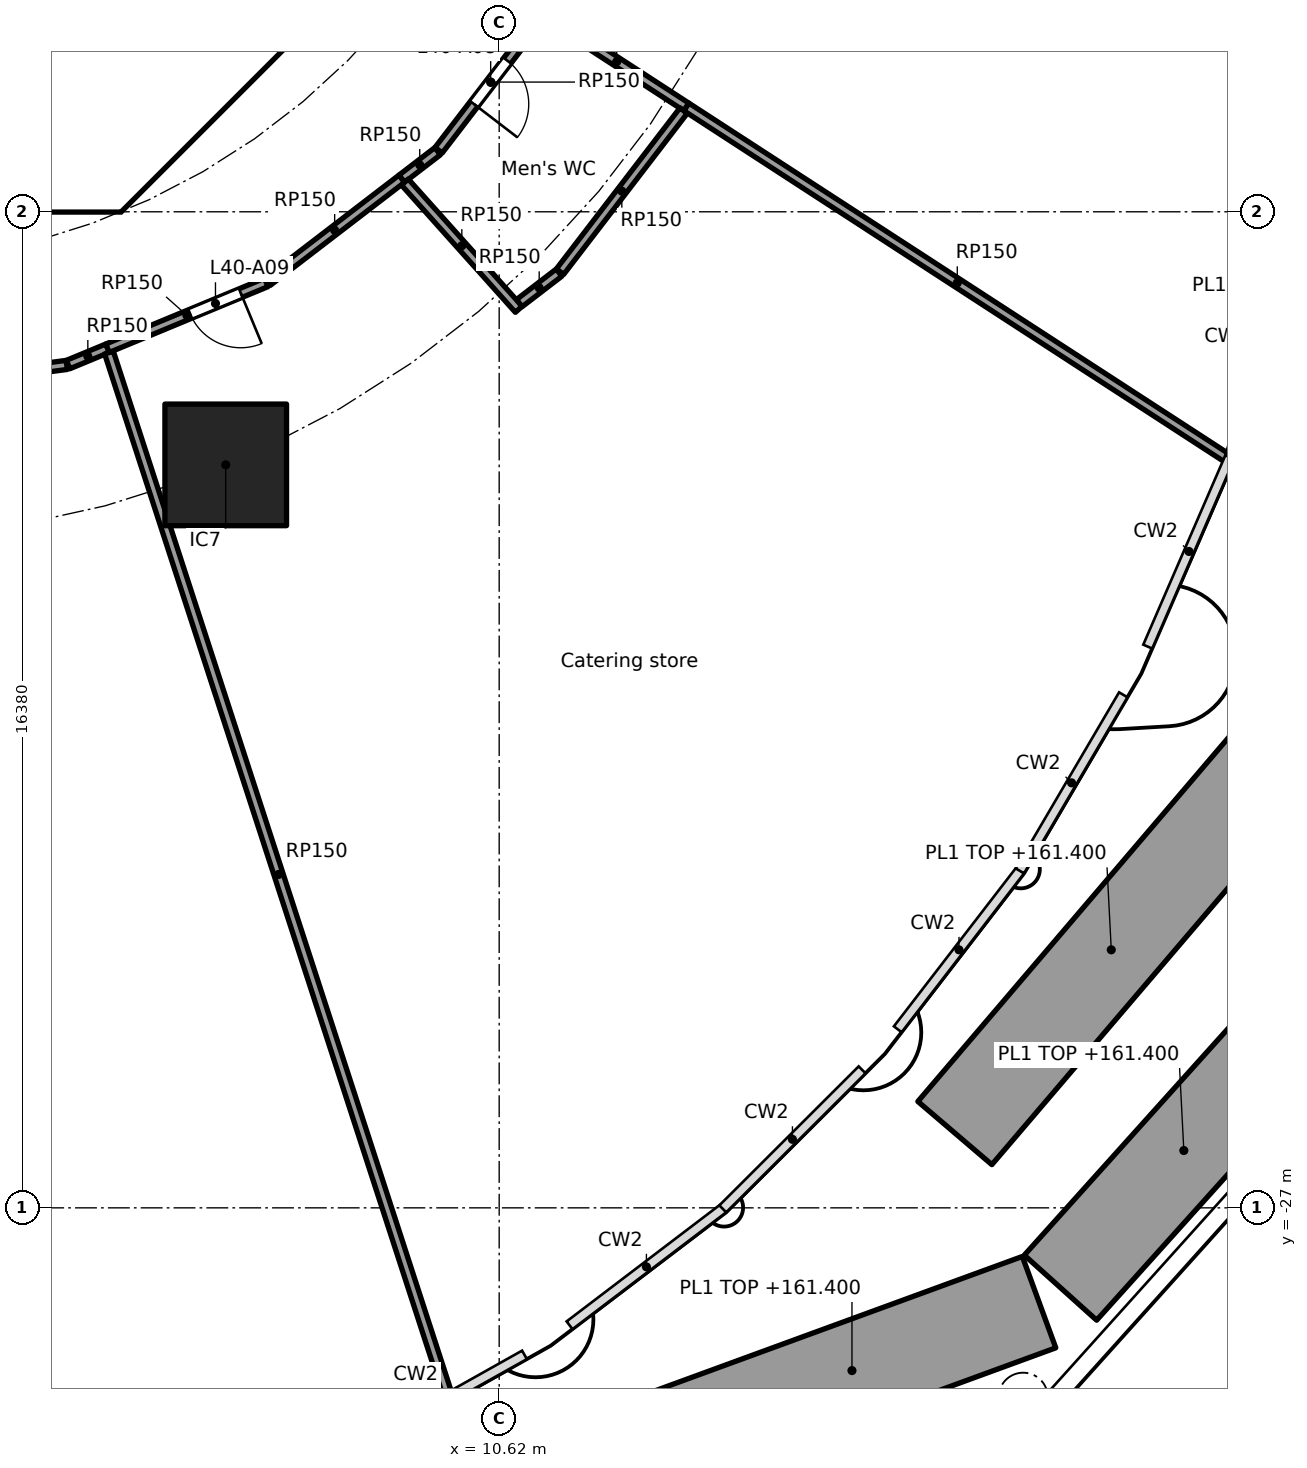
"""IFC4 building model, lengths in metres.
Left out: names, types, materials, properties, quantities, classifications, styles, units other than length and angle.
Written with IfcOpenShell. Run it as: python <this file> out.ifc"""

import sys

from ifc_helpers import new_model, si_unit, direction, frame, frame_2d, origin, origin_2d, place, context, subcontext, project, spatial, polyline, rectangle, outline, extrude, element, fill, save


model = new_model("IFC4")
c1 = context("Model", 3, precision=1e-05, world=origin(), true_north=direction((0.0, 1.0)))
c2 = subcontext(c1, "Body", "Model", "MODEL_VIEW")
j1 = project(units=[si_unit("LENGTHUNIT", "METRE"), si_unit("PLANEANGLEUNIT", "RADIAN")], contexts=[c1])
p1 = place(None, origin())
s1 = spatial("IfcSite", under=j1, at=p1, CompositionType="ELEMENT")
p2 = place(p1, origin())
s2 = spatial("IfcBuilding", under=s1, at=p2, CompositionType="ELEMENT")
p3 = place(p2, frame((0.0, 0.0, 160.3)))
s3 = spatial("IfcBuildingStorey", under=s2, at=p3, CompositionType="ELEMENT", Elevation=160.3)
p4 = place(p3, frame((6.123, -14.782, 0.0), z_axis=(0.0, 0.0, 1.0), x_axis=(1.0, 0.0, 0.0)))
e1 = element("IfcColumn", 1, at=p4, inside=s3, PredefinedType="COLUMN", context=c2, shape_type="SweptSolid", body=[
    extrude(rectangle(XDim=2.0, YDim=2.0, at=origin_2d()), origin(), (0.0, 0.0, 1.0), 5.6),
])
p5 = place(p3, frame((18.114, -25.77, 0.0), z_axis=(0.0, 0.0, 1.0), x_axis=(0.649270204453, 0.76055782266, 0.0)))
e2 = element("IfcWall", 2, at=p5, inside=s3, PredefinedType="SOLIDWALL", context=c2, shape_type="SweptSolid", body=[
    extrude(rectangle(XDim=7.924, YDim=1.6, at=frame_2d((3.962, 0.0))), origin(), (0.0, 0.0, 1.0), 1.1),
])
p6 = place(p3, frame((19.498, -28.551, 0.0), z_axis=(0.0, 0.0, 1.0), x_axis=(-0.939155395948, -0.343492565074, 0.0)))
e3 = element("IfcWall", 3, at=p6, inside=s3, PredefinedType="SOLIDWALL", context=c2, shape_type="SweptSolid", body=[
    extrude(rectangle(XDim=6.552, YDim=1.6, at=frame_2d((3.276, 0.0))), origin(), (0.0, 0.0, 1.0), 1.1),
])
p7 = place(p3, frame((23.908, -23.802, 0.0), z_axis=(0.0, 0.0, 1.0), x_axis=(-0.668693462174, -0.743538199184, 0.0)))
e4 = element("IfcWall", 4, at=p7, inside=s3, PredefinedType="SOLIDWALL", context=c2, shape_type="SweptSolid", body=[
    extrude(rectangle(XDim=6.067, YDim=1.6, at=frame_2d((3.034, 0.0))), origin(), (0.0, 0.0, 1.0), 1.1),
])
p8 = place(p3, frame((4.613, -9.988, 0.0), z_axis=(0.0, 0.0, 1.0), x_axis=(0.707106781187, 0.707106781187, 0.0)))
e5 = element("IfcWall", 5, at=p8, inside=s3, PredefinedType="SHEAR", context=c2, shape_type="SweptSolid", body=[
    extrude(rectangle(XDim=7.602, YDim=0.6, at=frame_2d((3.801, 0.0))), origin(), (0.0, 0.0, 1.0), 5.34),
])
p9 = place(p8, frame((3.201, 0.0, 0.0)))
e6 = element("IfcOpeningElement", 6, at=p9, cuts=e5, PredefinedType="OPENING", context=c2, shape_type="SweptSolid", body=[
    extrude(rectangle(XDim=1.2, YDim=2.1, at=frame_2d((0.6, 1.05))), frame((0.0, 0.31, 0.0), z_axis=(0.0, -1.0, 0.0), x_axis=(1.0, 0.0, 0.0)), (0.0, 0.0, 1.0), 0.62),
])
p10 = place(p3, frame((4.0, -10.025, 0.0), z_axis=(0.0, 0.0, 1.0), x_axis=(0.0, 1.0, 0.0)))
e7 = element("IfcWall", 7, at=p10, inside=s3, PredefinedType="SOLIDWALL", context=c2, shape_type="SweptSolid", body=[
    extrude(rectangle(XDim=3.0, YDim=0.2, at=frame_2d((1.5, 0.0))), origin(), (0.0, 0.0, 1.0), 5.34),
])
p11 = place(p10, frame((0.975, 0.0, 0.0)))
e8 = element("IfcOpeningElement", 8, at=p11, cuts=e7, PredefinedType="OPENING", context=c2, shape_type="SweptSolid", body=[
    extrude(rectangle(XDim=1.1, YDim=2.1, at=frame_2d((0.55, 1.05))), frame((0.0, 0.11, 0.0), z_axis=(0.0, -1.0, 0.0), x_axis=(1.0, 0.0, 0.0)), (0.0, 0.0, 1.0), 0.22),
])
p12 = place(p3, origin())
e9 = element("IfcWall", 9, at=p12, inside=s3, PredefinedType="SHEAR", context=c2, shape_type="SweptSolid", body=[
    extrude(outline(polyline([(-4.152, -10.025), (4.152, -10.025), (4.401, -9.776), (4.825, -10.2), (4.401, -10.625), (-4.401, -10.625), (-4.825, -10.2), (-4.401, -9.776), (-4.152, -10.025)])), origin(), (0.0, 0.0, 1.0), 5.34),
])
p13 = place(p3, frame((3.508, -13.138, 0.0), z_axis=(0.0, 0.0, 1.0), x_axis=(-0.991448403586, -0.130499283623, 0.0)))
e10 = element("IfcWall", 10, at=p13, inside=s3, PredefinedType="PARTITIONING", context=c2, shape_type="SweptSolid", body=[
    extrude(rectangle(XDim=3.527, YDim=0.15, at=frame_2d((1.763, 0.0))), origin(), (0.0, 0.0, 1.0), 5.34),
])
p14 = place(p13, frame((1.313, 0.0, 0.0)))
e11 = element("IfcOpeningElement", 11, at=p14, cuts=e10, PredefinedType="OPENING", context=c2, shape_type="SweptSolid", body=[
    extrude(rectangle(XDim=0.9, YDim=2.1, at=frame_2d((0.45, 1.05))), frame((0.0, 0.085, 0.0), z_axis=(0.0, -1.0, 0.0), x_axis=(1.0, 0.0, 0.0)), (0.0, 0.0, 1.0), 0.17),
])
p15 = place(p3, frame((4.18, -12.863, 0.0), z_axis=(0.0, 0.0, 1.0), x_axis=(-0.923877031545, -0.382689470177, 0.0)))
e12 = element("IfcWall", 12, at=p15, inside=s3, PredefinedType="PARTITIONING", context=c2, shape_type="SweptSolid", body=[
    extrude(rectangle(XDim=0.702, YDim=0.15, at=frame_2d((0.351, 0.0))), origin(), (0.0, 0.0, 1.0), 5.34),
])
p16 = place(p3, frame((4.203, -12.935, 0.0), z_axis=(0.0, 0.0, 1.0), x_axis=(0.309019390558, -0.951055737725, 0.0)))
e13 = element("IfcWall", 13, at=p16, inside=s3, PredefinedType="PARTITIONING", context=c2, shape_type="SweptSolid", body=[
    extrude(rectangle(XDim=18.048, YDim=0.15, at=frame_2d((9.024, 0.0))), origin(), (0.0, 0.0, 1.0), 5.34),
])
p17 = place(p3, frame((6.789, -11.782, 0.0), z_axis=(0.0, 0.0, 1.0), x_axis=(-0.923883033442, -0.382674980262, 0.0)))
e14 = element("IfcWall", 14, at=p17, inside=s3, PredefinedType="PARTITIONING", context=c2, shape_type="SweptSolid", body=[
    extrude(rectangle(XDim=2.824, YDim=0.15, at=frame_2d((1.412, 0.0))), origin(), (0.0, 0.0, 1.0), 5.34),
])
p18 = place(p17, frame((0.454, 0.0, 0.0)))
e15 = element("IfcOpeningElement", 15, at=p18, cuts=e14, PredefinedType="OPENING", context=c2, shape_type="SweptSolid", body=[
    extrude(rectangle(XDim=0.9, YDim=2.1, at=frame_2d((0.45, 1.05))), frame((0.0, 0.085, 0.0), z_axis=(0.0, -1.0, 0.0), x_axis=(1.0, 0.0, 0.0)), (0.0, 0.0, 1.0), 0.17),
])
p19 = place(p3, frame((9.019, -10.075, 0.0), z_axis=(0.0, 0.0, 1.0), x_axis=(-0.793356581691, -0.608757204711, 0.0)))
e16 = element("IfcWall", 16, at=p19, inside=s3, PredefinedType="PARTITIONING", context=c2, shape_type="SweptSolid", body=[
    extrude(rectangle(XDim=2.785, YDim=0.15, at=frame_2d((1.393, 0.0))), origin(), (0.0, 0.0, 1.0), 5.34),
])
p20 = place(p3, frame((9.607, -9.624, 0.0), z_axis=(0.0, 0.0, 1.0), x_axis=(-0.793431391307, -0.608659697441, 0.0)))
e17 = element("IfcWall", 17, at=p20, inside=s3, PredefinedType="PARTITIONING", context=c2, shape_type="SweptSolid", body=[
    extrude(rectangle(XDim=0.741, YDim=0.15, at=frame_2d((0.371, 0.0))), origin(), (0.0, 0.0, 1.0), 5.34),
])
p21 = place(p3, frame((10.942, -12.224, 0.0), z_axis=(0.0, 0.0, 1.0), x_axis=(-0.666993055926, 0.745063932389, 0.0)))
e18 = element("IfcWall", 18, at=p21, inside=s3, PredefinedType="PARTITIONING", context=c2, shape_type="SweptSolid", body=[
    extrude(rectangle(XDim=2.808, YDim=0.15, at=frame_2d((1.404, 0.0))), origin(), (0.0, 0.0, 1.0), 5.34),
])
p22 = place(p3, frame((11.343, -7.366, 0.0), z_axis=(0.0, 0.0, 1.0), x_axis=(-0.608732750311, -0.793375345407, 0.0)))
e19 = element("IfcWall", 19, at=p22, inside=s3, PredefinedType="PARTITIONING", context=c2, shape_type="SweptSolid", body=[
    extrude(rectangle(XDim=2.824, YDim=0.15, at=frame_2d((1.412, 0.0))), origin(), (0.0, 0.0, 1.0), 5.34),
])
p23 = place(p22, frame((0.968, 0.0, 0.0)))
e20 = element("IfcOpeningElement", 20, at=p23, cuts=e19, PredefinedType="OPENING", context=c2, shape_type="SweptSolid", body=[
    extrude(rectangle(XDim=0.9, YDim=2.1, at=frame_2d((0.45, 1.05))), frame((0.0, 0.085, 0.0), z_axis=(0.0, -1.0, 0.0), x_axis=(1.0, 0.0, 0.0)), (0.0, 0.0, 1.0), 0.17),
])
p24 = place(p3, frame((11.406, -7.407, 0.0), z_axis=(0.0, 0.0, 1.0), x_axis=(0.838682314257, -0.544620946855, 0.0)))
e21 = element("IfcWall", 21, at=p24, inside=s3, PredefinedType="PARTITIONING", context=c2, shape_type="SweptSolid", body=[
    extrude(rectangle(XDim=2.733, YDim=0.15, at=frame_2d((1.367, 0.0))), origin(), (0.0, 0.0, 1.0), 5.34),
])
p25 = place(p3, frame((11.604, -11.621, 0.0), z_axis=(0.0, 0.0, 1.0), x_axis=(-0.793219322038, -0.608936045201, 0.0)))
e22 = element("IfcWall", 22, at=p25, inside=s3, PredefinedType="PARTITIONING", context=c2, shape_type="SweptSolid", body=[
    extrude(rectangle(XDim=0.823, YDim=0.15, at=frame_2d((0.411, 0.0))), origin(), (0.0, 0.0, 1.0), 5.34),
])
p26 = place(p3, frame((13.653, -8.956, 0.0), z_axis=(0.0, 0.0, 1.0), x_axis=(-0.608763124529, -0.79335203927, 0.0)))
e23 = element("IfcWall", 23, at=p26, inside=s3, PredefinedType="PARTITIONING", context=c2, shape_type="SweptSolid", body=[
    extrude(rectangle(XDim=3.338, YDim=0.15, at=frame_2d((1.669, 0.0))), origin(), (0.0, 0.0, 1.0), 5.34),
])
p27 = place(p3, frame((13.699, -8.896, 0.0), z_axis=(0.0, 0.0, 1.0), x_axis=(0.838668797017, -0.544641761996, 0.0)))
e24 = element("IfcWall", 24, at=p27, inside=s3, PredefinedType="PARTITIONING", context=c2, shape_type="SweptSolid", body=[
    extrude(rectangle(XDim=10.623, YDim=0.15, at=frame_2d((5.312, 0.0))), origin(), (0.0, 0.0, 1.0), 5.34),
])
p28 = place(p11, origin())
e25 = element("IfcDoor", 25, at=p28, inside=s3, OperationType="SINGLE_SWING_LEFT", PredefinedType="DOOR", context=c2, shape_type="SweptSolid", body=[
    extrude(rectangle(XDim=1.1, YDim=2.1, at=frame_2d((0.55, 1.05))), frame((0.0, 0.025, 0.0), z_axis=(0.0, -1.0, 0.0), x_axis=(1.0, 0.0, 0.0)), (0.0, 0.0, 1.0), 0.05),
])
fill(e8, e25)
p29 = place(p23, origin())
e26 = element("IfcDoor", 26, at=p29, inside=s3, OperationType="SINGLE_SWING_RIGHT", PredefinedType="DOOR", context=c2, shape_type="SweptSolid", body=[
    extrude(rectangle(XDim=0.9, YDim=2.1, at=frame_2d((0.45, 1.05))), frame((0.0, 0.025, 0.0), z_axis=(0.0, -1.0, 0.0), x_axis=(1.0, 0.0, 0.0)), (0.0, 0.0, 1.0), 0.05),
])
fill(e20, e26)
p30 = place(p18, origin())
e27 = element("IfcDoor", 27, at=p30, inside=s3, OperationType="SINGLE_SWING_LEFT", PredefinedType="DOOR", context=c2, shape_type="SweptSolid", body=[
    extrude(rectangle(XDim=0.9, YDim=2.1, at=frame_2d((0.45, 1.05))), frame((0.0, 0.025, 0.0), z_axis=(0.0, -1.0, 0.0), x_axis=(1.0, 0.0, 0.0)), (0.0, 0.0, 1.0), 0.05),
])
fill(e15, e27)
save(model, sys.argv[1])
